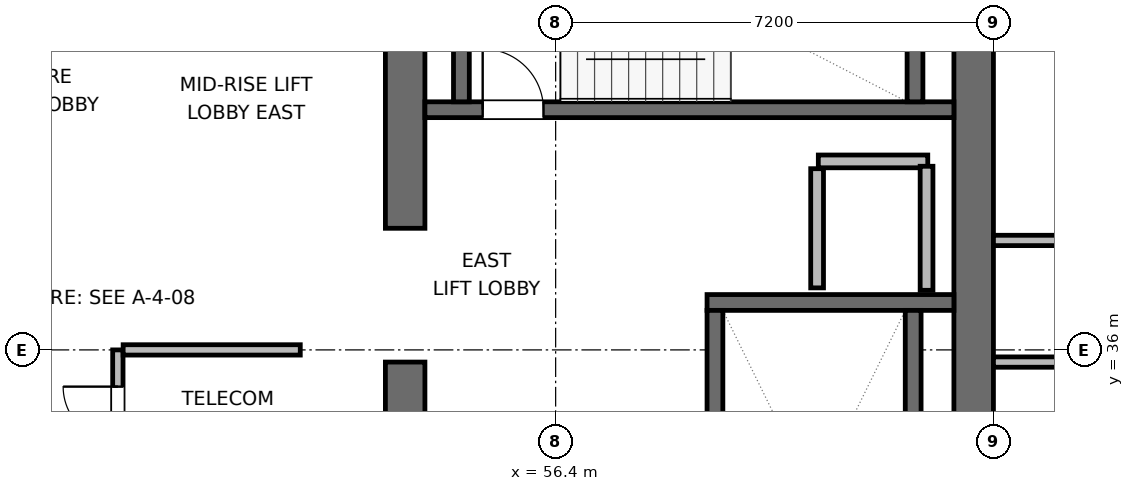
"""IFC4 building model, lengths in metres.
Left out: names, types, materials, properties, quantities, classifications, styles, units other than length and angle.
Written with IfcOpenShell. Run it as: python <this file> out.ifc"""

import sys

from ifc_helpers import new_model, si_unit, direction, frame, frame_2d, origin, place, context, subcontext, project, spatial, rectangle, extrude, element, fill, save


model = new_model("IFC4")
c1 = context("Model", 3, precision=1e-05, world=origin(), true_north=direction((0.0, 1.0)))
c2 = subcontext(c1, "Body", "Model", "MODEL_VIEW")
j1 = project(units=[si_unit("LENGTHUNIT", "METRE"), si_unit("PLANEANGLEUNIT", "RADIAN")], contexts=[c1])
p1 = place(None, origin())
s1 = spatial("IfcSite", under=j1, at=p1, CompositionType="ELEMENT")
p2 = place(p1, origin())
s2 = spatial("IfcBuilding", under=s1, at=p2, CompositionType="ELEMENT")
p3 = place(p2, frame((0.0, 0.0, 205.8)))
s3 = spatial("IfcBuildingStorey", under=s2, at=p3, CompositionType="ELEMENT", Elevation=205.8)
p4 = place(p3, frame((53.925, 27.925, 0.0), z_axis=(0.0, 0.0, 1.0), x_axis=(0.0, 1.0, 0.0)))
e1 = element("IfcWall", 1, at=p4, inside=s3, PredefinedType="SHEAR", context=c2, shape_type="SweptSolid", body=[
    extrude(rectangle(XDim=7.875, YDim=0.65, at=frame_2d((3.938, 0.0))), origin(), (0.0, 0.0, 1.0), 3.9),
])
p5 = place(p3, frame((53.925, 38.0, 0.0), z_axis=(0.0, 0.0, 1.0), x_axis=(0.0, 1.0, 0.0)))
e2 = element("IfcWall", 2, at=p5, inside=s3, PredefinedType="SHEAR", context=c2, shape_type="SweptSolid", body=[
    extrude(rectangle(XDim=6.075, YDim=0.65, at=frame_2d((3.038, 0.0))), origin(), (0.0, 0.0, 1.0), 3.9),
])
p6 = place(p3, frame((63.275, 27.6, 0.0), z_axis=(0.0, 0.0, 1.0), x_axis=(0.0, 1.0, 0.0)))
e3 = element("IfcWall", 3, at=p6, inside=s3, PredefinedType="SHEAR", context=c2, shape_type="SweptSolid", body=[
    extrude(rectangle(XDim=16.8, YDim=0.65, at=frame_2d((8.4, 0.0))), origin(), (0.0, 0.0, 1.0), 3.9),
])
p7 = place(p3, frame((58.89, 36.78, 0.0), z_axis=(0.0, 0.0, 1.0), x_axis=(1.0, 0.0, 0.0)))
e4 = element("IfcWall", 4, at=p7, inside=s3, PredefinedType="SHEAR", context=c2, shape_type="SweptSolid", body=[
    extrude(rectangle(XDim=4.06, YDim=0.26, at=frame_2d((2.03, 0.0))), origin(), (0.0, 0.0, 1.0), 3.9),
])
p8 = place(p3, frame((59.02, 29.05, 0.0), z_axis=(0.0, 0.0, 1.0), x_axis=(0.0, 1.0, 0.0)))
e5 = element("IfcWall", 5, at=p8, inside=s3, PredefinedType="SHEAR", context=c2, shape_type="SweptSolid", body=[
    extrude(rectangle(XDim=7.6, YDim=0.26, at=frame_2d((3.8, 0.0))), origin(), (0.0, 0.0, 1.0), 3.9),
])
p9 = place(p8, frame((0.3, 0.0, 0.0)))
e6 = element("IfcOpeningElement", 6, at=p9, cuts=e5, PredefinedType="OPENING", context=c2, shape_type="SweptSolid", body=[
    extrude(rectangle(XDim=1.0, YDim=2.04, at=frame_2d((0.5, 1.02))), frame((0.0, 0.14, 0.0), z_axis=(0.0, -1.0, 0.0), x_axis=(1.0, 0.0, 0.0)), (0.0, 0.0, 1.0), 0.28),
])
p10 = place(p3, frame((62.28, 29.05, 0.0), z_axis=(0.0, 0.0, 1.0), x_axis=(0.0, 1.0, 0.0)))
e7 = element("IfcWall", 7, at=p10, inside=s3, PredefinedType="SHEAR", context=c2, shape_type="SweptSolid", body=[
    extrude(rectangle(XDim=7.6, YDim=0.26, at=frame_2d((3.8, 0.0))), origin(), (0.0, 0.0, 1.0), 3.9),
])
p11 = place(p3, frame((54.25, 39.95, 0.0), z_axis=(0.0, 0.0, 1.0), x_axis=(1.0, 0.0, 0.0)))
e8 = element("IfcWall", 8, at=p11, inside=s3, PredefinedType="SHEAR", context=c2, shape_type="SweptSolid", body=[
    extrude(rectangle(XDim=8.7, YDim=0.26, at=frame_2d((4.35, 0.0))), origin(), (0.0, 0.0, 1.0), 3.9),
])
p12 = place(p11, frame((0.95, 0.0, 0.0)))
e9 = element("IfcOpeningElement", 9, at=p12, cuts=e8, PredefinedType="OPENING", context=c2, shape_type="SweptSolid", body=[
    extrude(rectangle(XDim=1.0, YDim=2.04, at=frame_2d((0.5, 1.02))), frame((0.0, 0.14, 0.0), z_axis=(0.0, -1.0, 0.0), x_axis=(1.0, 0.0, 0.0)), (0.0, 0.0, 1.0), 0.28),
])
for number, where, z_axis, x_axis in (
    (10, (54.85, 40.08, 0.0), (0.0, 0.0, 1.0), (0.0, 1.0, 0.0)),
    (11, (62.31, 40.08, 0.0), (0.0, 0.0, 1.0), (0.0, 1.0, 0.0)),
):
    element("IfcWall", number, at=place(p3, frame(where, z_axis=z_axis, x_axis=x_axis)), inside=s3, PredefinedType="SHEAR", context=c2, shape_type="SweptSolid", body=[
        extrude(rectangle(XDim=2.94, YDim=0.26, at=frame_2d((1.47, 0.0))), origin(), (0.0, 0.0, 1.0), 3.9),
    ])
p13 = place(p3, frame((60.72, 39.1, 0.0), z_axis=(0.0, 0.0, 1.0), x_axis=(1.0, 0.0, 0.0)))
e12 = element("IfcWall", 12, at=p13, inside=s3, PredefinedType="PARTITIONING", context=c2, shape_type="SweptSolid", body=[
    extrude(rectangle(XDim=1.8, YDim=0.21, at=frame_2d((0.9, 0.0))), origin(), (0.0, 0.0, 1.0), 3.6),
])
p14 = place(p3, frame((60.7, 37.02, 0.0), z_axis=(0.0, 0.0, 1.0), x_axis=(0.0, 1.0, 0.0)))
e13 = element("IfcWall", 13, at=p14, inside=s3, PredefinedType="PARTITIONING", context=c2, shape_type="SweptSolid", body=[
    extrude(rectangle(XDim=1.96, YDim=0.21, at=frame_2d((0.98, 0.0))), origin(), (0.0, 0.0, 1.0), 3.6),
])
p15 = place(p3, frame((62.5, 36.98, 0.0), z_axis=(0.0, 0.0, 1.0), x_axis=(0.0, 1.0, 0.0)))
e14 = element("IfcWall", 14, at=p15, inside=s3, PredefinedType="PARTITIONING", context=c2, shape_type="SweptSolid", body=[
    extrude(rectangle(XDim=2.04, YDim=0.21, at=frame_2d((1.02, 0.0))), origin(), (0.0, 0.0, 1.0), 3.6),
])
p16 = place(p3, frame((49.2, 32.6, 0.0), z_axis=(0.0, 0.0, 1.0), x_axis=(0.0, 1.0, 0.0)))
e15 = element("IfcWall", 15, at=p16, inside=s3, PredefinedType="PARTITIONING", context=c2, shape_type="SweptSolid", body=[
    extrude(rectangle(XDim=3.4, YDim=0.17, at=frame_2d((1.7, 0.0))), origin(), (0.0, 0.0, 1.0), 3.6),
])
p17 = place(p16, frame((0.196, 0.0, 0.0)))
e16 = element("IfcOpeningElement", 16, at=p17, cuts=e15, PredefinedType="OPENING", context=c2, shape_type="SweptSolid", body=[
    extrude(rectangle(XDim=0.9, YDim=2.02, at=frame_2d((0.45, 1.01))), frame((0.0, 0.095, 0.0), z_axis=(0.0, -1.0, 0.0), x_axis=(1.0, 0.0, 0.0)), (0.0, 0.0, 1.0), 0.19),
])
p18 = place(p16, frame((1.896, 0.0, 0.0)))
e17 = element("IfcOpeningElement", 17, at=p18, cuts=e15, PredefinedType="OPENING", context=c2, shape_type="SweptSolid", body=[
    extrude(rectangle(XDim=0.9, YDim=2.02, at=frame_2d((0.45, 1.01))), frame((0.0, 0.095, 0.0), z_axis=(0.0, -1.0, 0.0), x_axis=(1.0, 0.0, 0.0)), (0.0, 0.0, 1.0), 0.19),
])
p19 = place(p3, frame((49.287, 36.0, 0.0), z_axis=(0.0, 0.0, 1.0), x_axis=(1.0, 0.0, 0.0)))
e18 = element("IfcWall", 18, at=p19, inside=s3, PredefinedType="PARTITIONING", context=c2, shape_type="SweptSolid", body=[
    extrude(rectangle(XDim=2.913, YDim=0.17, at=frame_2d((1.457, 0.0))), origin(), (0.0, 0.0, 1.0), 3.6),
])
p20 = place(p3, frame((63.6, 35.8, 0.0), z_axis=(0.0, 0.0, 1.0), x_axis=(1.0, 0.0, 0.0)))
e19 = element("IfcWall", 19, at=p20, inside=s3, PredefinedType="PARTITIONING", context=c2, shape_type="SweptSolid", body=[
    extrude(rectangle(XDim=6.975, YDim=0.17, at=frame_2d((3.487, 0.0))), origin(), (0.0, 0.0, 1.0), 2.135),
])
p21 = place(p20, frame((1.1, 0.0, 0.0)))
e20 = element("IfcOpeningElement", 20, at=p21, cuts=e19, PredefinedType="OPENING", context=c2, shape_type="SweptSolid", body=[
    extrude(rectangle(XDim=0.95, YDim=2.04, at=frame_2d((0.475, 1.02))), frame((0.0, 0.095, 0.0), z_axis=(0.0, -1.0, 0.0), x_axis=(1.0, 0.0, 0.0)), (0.0, 0.0, 1.0), 0.19),
])
p22 = place(p3, frame((63.6, 37.8, 0.0), z_axis=(0.0, 0.0, 1.0), x_axis=(1.0, 0.0, 0.0)))
e21 = element("IfcWall", 21, at=p22, inside=s3, PredefinedType="PARTITIONING", context=c2, shape_type="SweptSolid", body=[
    extrude(rectangle(XDim=4.96, YDim=0.17, at=frame_2d((2.48, 0.0))), origin(), (0.0, 0.0, 1.0), 3.6),
])
p23 = place(p22, frame((1.1, 0.0, 0.0)))
e22 = element("IfcOpeningElement", 22, at=p23, cuts=e21, PredefinedType="OPENING", context=c2, shape_type="SweptSolid", body=[
    extrude(rectangle(XDim=0.95, YDim=2.04, at=frame_2d((0.475, 1.02))), frame((0.0, 0.095, 0.0), z_axis=(0.0, -1.0, 0.0), x_axis=(1.0, 0.0, 0.0)), (0.0, 0.0, 1.0), 0.19),
])
p24 = place(p12, origin())
e23 = element("IfcDoor", 23, at=p24, inside=s3, OperationType="SINGLE_SWING_LEFT", PredefinedType="DOOR", context=c2, shape_type="SweptSolid", body=[
    extrude(rectangle(XDim=1.0, YDim=2.04, at=frame_2d((0.5, 1.02))), frame((0.0, 0.025, 0.0), z_axis=(0.0, -1.0, 0.0), x_axis=(1.0, 0.0, 0.0)), (0.0, 0.0, 1.0), 0.05),
])
fill(e9, e23)
p25 = place(p18, origin())
e24 = element("IfcDoor", 24, at=p25, inside=s3, OperationType="SINGLE_SWING_RIGHT", PredefinedType="DOOR", context=c2, shape_type="SweptSolid", body=[
    extrude(rectangle(XDim=0.9, YDim=2.02, at=frame_2d((0.45, 1.01))), frame((0.0, 0.025, 0.0), z_axis=(0.0, -1.0, 0.0), x_axis=(1.0, 0.0, 0.0)), (0.0, 0.0, 1.0), 0.05),
])
fill(e17, e24)
save(model, sys.argv[1])
